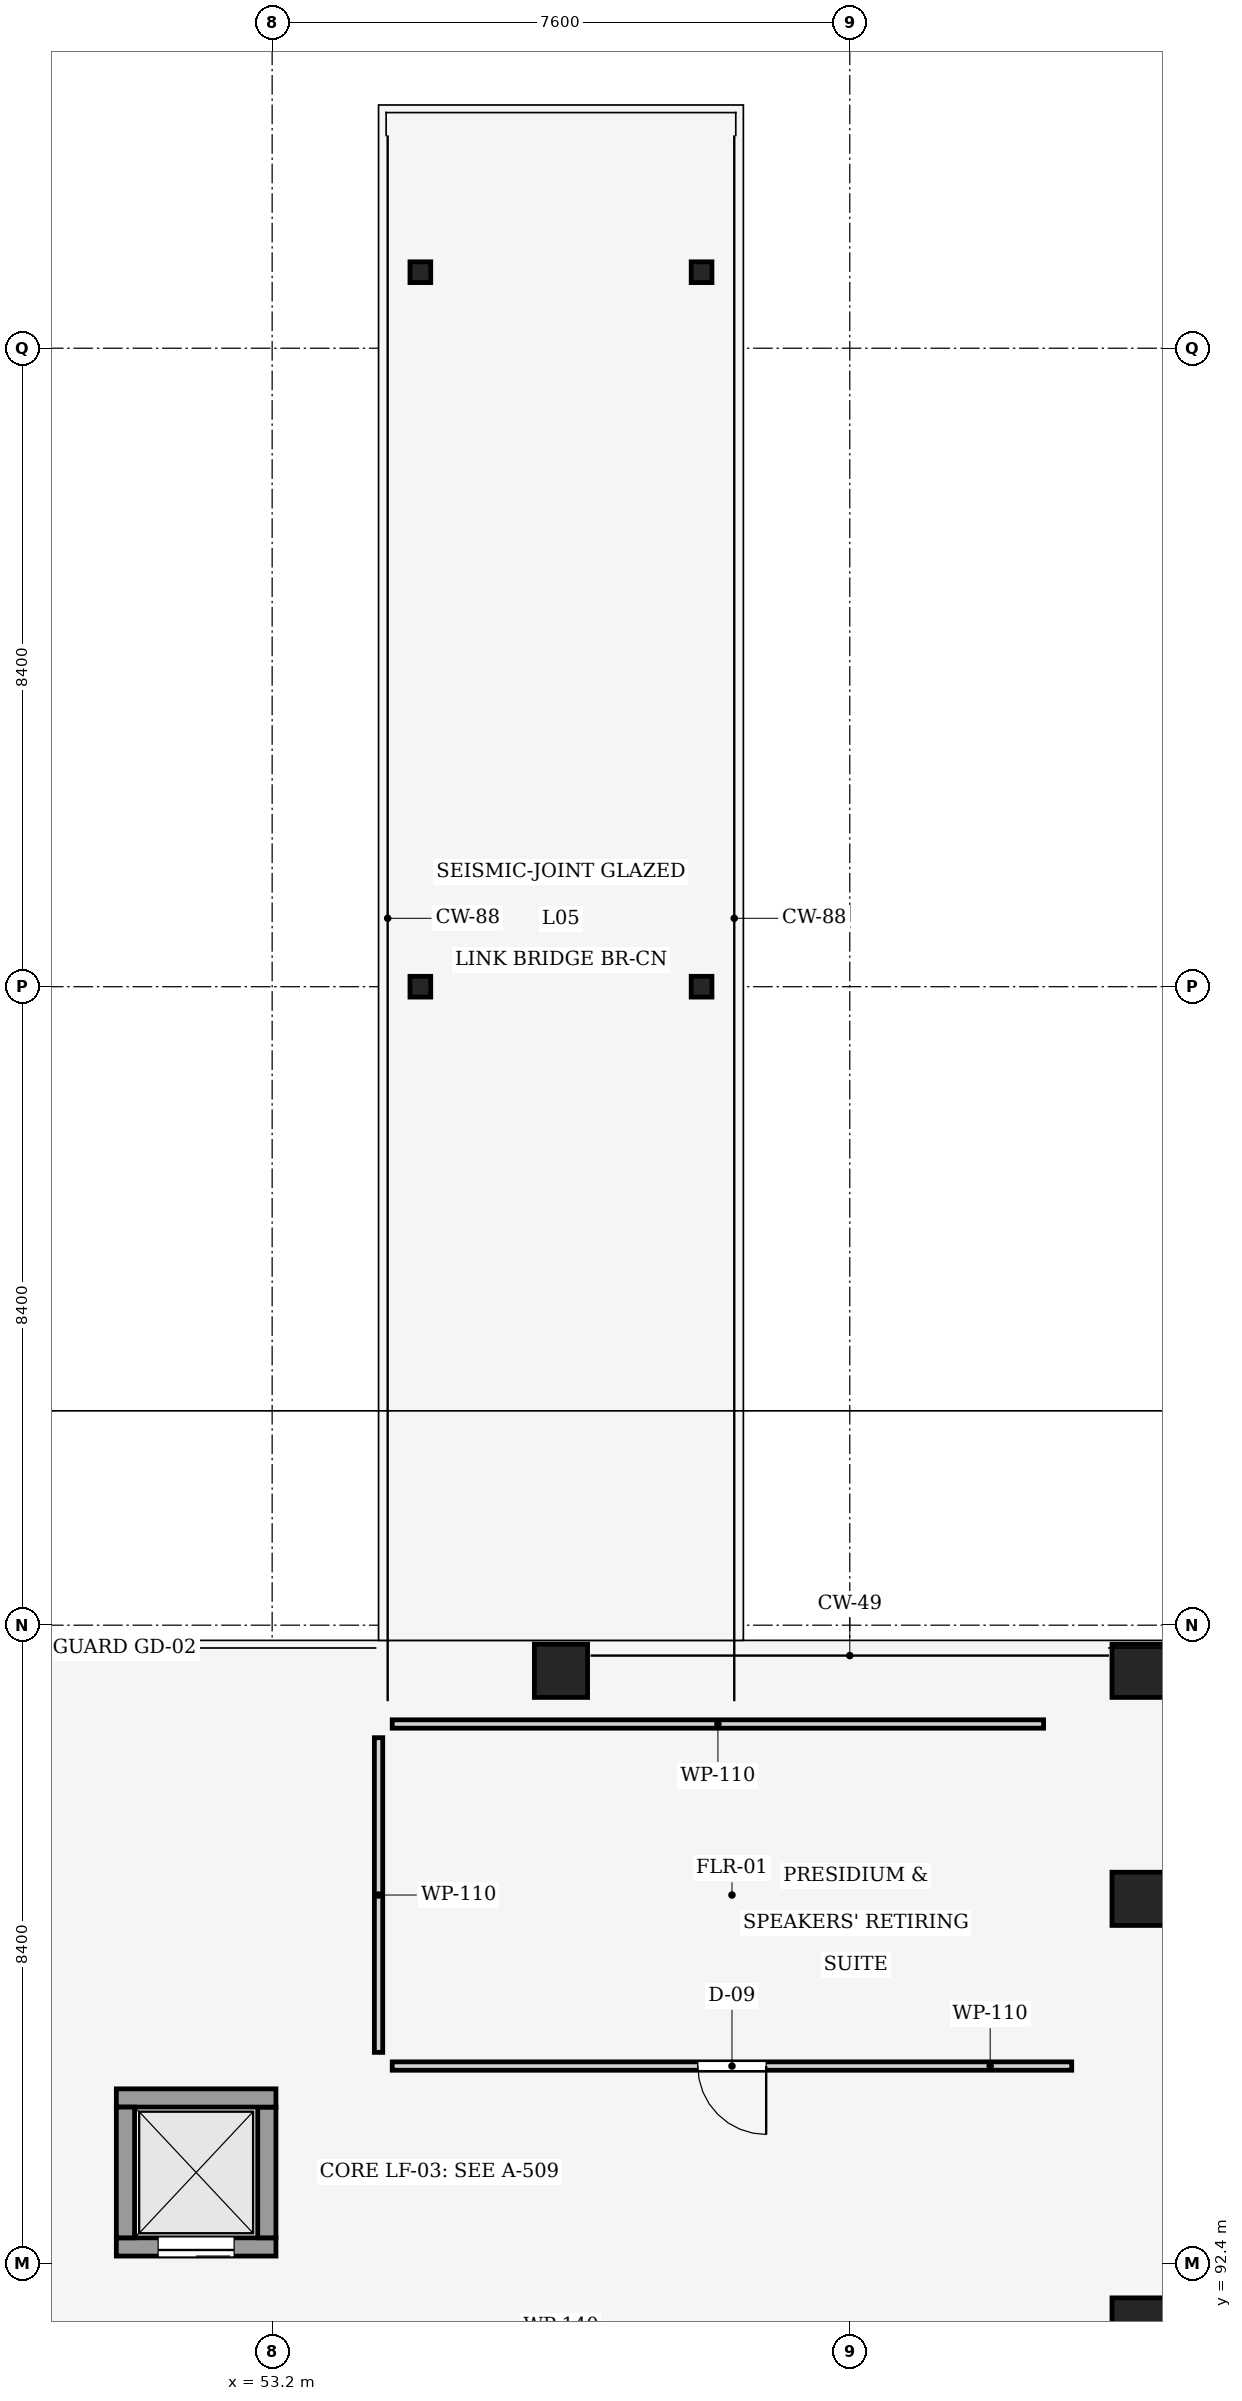
"""IFC4 building model, lengths in metres.
Left out: names, types, materials, properties, quantities, classifications, styles, units other than length and angle.
Written with IfcOpenShell. Run it as: python <this file> out.ifc"""

import sys

from ifc_helpers import new_model, si_unit, direction, frame, frame_2d, origin, origin_2d, place, context, subcontext, project, spatial, rectangle, hollow_circle, extrude, element, fill, save


model = new_model("IFC4")
c1 = context("Model", 3, precision=1e-05, world=origin(), true_north=direction((0.0, 1.0)))
c2 = subcontext(c1, "Body", "Model", "MODEL_VIEW")
j1 = project(units=[si_unit("LENGTHUNIT", "METRE"), si_unit("PLANEANGLEUNIT", "RADIAN")], contexts=[c1])
p1 = place(None, origin())
s1 = spatial("IfcSite", under=j1, at=p1, CompositionType="ELEMENT")
p2 = place(p1, origin())
s2 = spatial("IfcBuilding", under=s1, at=p2, CompositionType="ELEMENT")
p3 = place(p2, frame((0.0, 0.0, 21.3)))
s3 = spatial("IfcBuildingStorey", under=s2, at=p3, CompositionType="ELEMENT", Elevation=21.3)
for number, where, z_axis, x_axis in (
    (1, (64.6, 91.6, 0.0), (0.0, 0.0, 1.0), (1.0, 0.0, 0.0)),
    (2, (64.6, 97.2, 0.0), (0.0, 0.0, 1.0), (1.0, 0.0, 0.0)),
    (3, (57.0, 100.2, 0.0), (0.0, 0.0, 1.0), (1.0, 0.0, 0.0)),
    (4, (64.6, 100.2, 0.0), (0.0, 0.0, 1.0), (1.0, 0.0, 0.0)),
):
    element("IfcColumn", number, at=place(p3, frame(where, z_axis=z_axis, x_axis=x_axis)), inside=s3, PredefinedType="COLUMN", context=c2, shape_type="SweptSolid", body=[
        extrude(rectangle(XDim=0.7, YDim=0.7, at=origin_2d()), origin(), (0.0, 0.0, 1.0), 4.05),
    ])
for number, where, z_axis, x_axis in (
    (5, (55.15, 109.2, 0.0), (0.0, 0.0, 1.0), (1.0, 0.0, 0.0)),
    (6, (58.85, 109.2, 0.0), (0.0, 0.0, 1.0), (1.0, 0.0, 0.0)),
    (7, (58.85, 118.6, 0.0), (0.0, 0.0, 1.0), (1.0, 0.0, 0.0)),
    (8, (55.15, 118.6, 0.0), (0.0, 0.0, 1.0), (1.0, 0.0, 0.0)),
):
    element("IfcColumn", number, at=place(p3, frame(where, z_axis=z_axis, x_axis=x_axis)), inside=s3, PredefinedType="COLUMN", context=c2, shape_type="SweptSolid", body=[
        extrude(hollow_circle(Radius=0.136, WallThickness=0.016, at=origin_2d()), origin(), (0.0, 0.0, 1.0), 3.82),
    ])
p4 = place(p3, frame((53.25, 92.62, 0.0), z_axis=(0.0, 0.0, 1.0), x_axis=(-1.0, 0.0, 0.0)))
e9 = element("IfcWall", 9, at=p4, inside=s3, PredefinedType="SHEAR", context=c2, shape_type="SweptSolid", body=[
    extrude(rectangle(XDim=2.1, YDim=0.24, at=frame_2d((1.05, 0.0))), origin(), (0.0, 0.0, 1.0), 4.05),
])
p5 = place(p4, frame((0.55, 0.0, 0.0)))
e10 = element("IfcOpeningElement", 10, at=p5, cuts=e9, PredefinedType="OPENING", context=c2, shape_type="SweptSolid", body=[
    extrude(rectangle(XDim=1.0, YDim=2.15, at=frame_2d((0.5, 1.075))), frame((0.0, 0.13, 0.0), z_axis=(0.0, -1.0, 0.0), x_axis=(1.0, 0.0, 0.0)), (0.0, 0.0, 1.0), 0.26),
])
p6 = place(p3, frame((53.13, 94.46, 0.0), z_axis=(0.0, 0.0, 1.0), x_axis=(0.0, -1.0, 0.0)))
e11 = element("IfcWall", 11, at=p6, inside=s3, PredefinedType="SHEAR", context=c2, shape_type="SweptSolid", body=[
    extrude(rectangle(XDim=1.72, YDim=0.24, at=frame_2d((0.86, 0.0))), origin(), (0.0, 0.0, 1.0), 4.05),
])
p7 = place(p3, frame((51.15, 94.58, 0.0), z_axis=(0.0, 0.0, 1.0), x_axis=(1.0, 0.0, 0.0)))
e12 = element("IfcWall", 12, at=p7, inside=s3, PredefinedType="SHEAR", context=c2, shape_type="SweptSolid", body=[
    extrude(rectangle(XDim=2.1, YDim=0.24, at=frame_2d((1.05, 0.0))), origin(), (0.0, 0.0, 1.0), 4.05),
])
p8 = place(p3, frame((51.27, 92.74, 0.0), z_axis=(0.0, 0.0, 1.0), x_axis=(0.0, 1.0, 0.0)))
e13 = element("IfcWall", 13, at=p8, inside=s3, PredefinedType="SHEAR", context=c2, shape_type="SweptSolid", body=[
    extrude(rectangle(XDim=1.72, YDim=0.24, at=frame_2d((0.86, 0.0))), origin(), (0.0, 0.0, 1.0), 4.05),
])
p9 = place(p3, frame((63.72, 95.0, 0.0), z_axis=(0.0, 0.0, 1.0), x_axis=(-1.0, 0.0, 0.0)))
e14 = element("IfcWall", 14, at=p9, inside=s3, PredefinedType="PARTITIONING", context=c2, shape_type="SweptSolid", body=[
    extrude(rectangle(XDim=8.94, YDim=0.11, at=frame_2d((4.47, 0.0))), origin(), (0.0, 0.0, 1.0), 3.7),
])
p10 = place(p9, frame((4.02, 0.0, 0.0)))
e15 = element("IfcOpeningElement", 15, at=p10, cuts=e14, PredefinedType="OPENING", context=c2, shape_type="SweptSolid", body=[
    extrude(rectangle(XDim=0.9, YDim=2.22, at=frame_2d((0.45, 1.11))), frame((0.0, 0.065, 0.0), z_axis=(0.0, -1.0, 0.0), x_axis=(1.0, 0.0, 0.0)), (0.0, 0.0, 1.0), 0.13),
])
p11 = place(p3, frame((54.6, 95.18, 0.0), z_axis=(0.0, 0.0, 1.0), x_axis=(0.0, 1.0, 0.0)))
e16 = element("IfcWall", 16, at=p11, inside=s3, PredefinedType="PARTITIONING", context=c2, shape_type="SweptSolid", body=[
    extrude(rectangle(XDim=4.14, YDim=0.11, at=frame_2d((2.07, 0.0))), origin(), (0.0, 0.0, 1.0), 3.115),
])
p12 = place(p3, frame((54.78, 99.5, 0.0), z_axis=(0.0, 0.0, 1.0), x_axis=(1.0, 0.0, 0.0)))
e17 = element("IfcWall", 17, at=p12, inside=s3, PredefinedType="PARTITIONING", context=c2, shape_type="SweptSolid", body=[
    extrude(rectangle(XDim=8.57, YDim=0.11, at=frame_2d((4.285, 0.0))), origin(), (0.0, 0.0, 1.0), 3.7),
])
p13 = place(p5, origin())
e18 = element("IfcDoor", 18, at=p13, inside=s3, OperationType="SLIDING_TO_LEFT", PredefinedType="DOOR", context=c2, shape_type="SweptSolid", body=[
    extrude(rectangle(XDim=1.0, YDim=2.15, at=frame_2d((0.5, 1.075))), frame((0.0, 0.025, 0.0), z_axis=(0.0, -1.0, 0.0), x_axis=(1.0, 0.0, 0.0)), (0.0, 0.0, 1.0), 0.05),
])
fill(e10, e18)
p14 = place(p10, origin())
e19 = element("IfcDoor", 19, at=p14, inside=s3, OperationType="SINGLE_SWING_LEFT", PredefinedType="DOOR", context=c2, shape_type="SweptSolid", body=[
    extrude(rectangle(XDim=0.9, YDim=2.22, at=frame_2d((0.45, 1.11))), frame((0.0, 0.025, 0.0), z_axis=(0.0, -1.0, 0.0), x_axis=(1.0, 0.0, 0.0)), (0.0, 0.0, 1.0), 0.05),
])
fill(e15, e19)
save(model, sys.argv[1])
